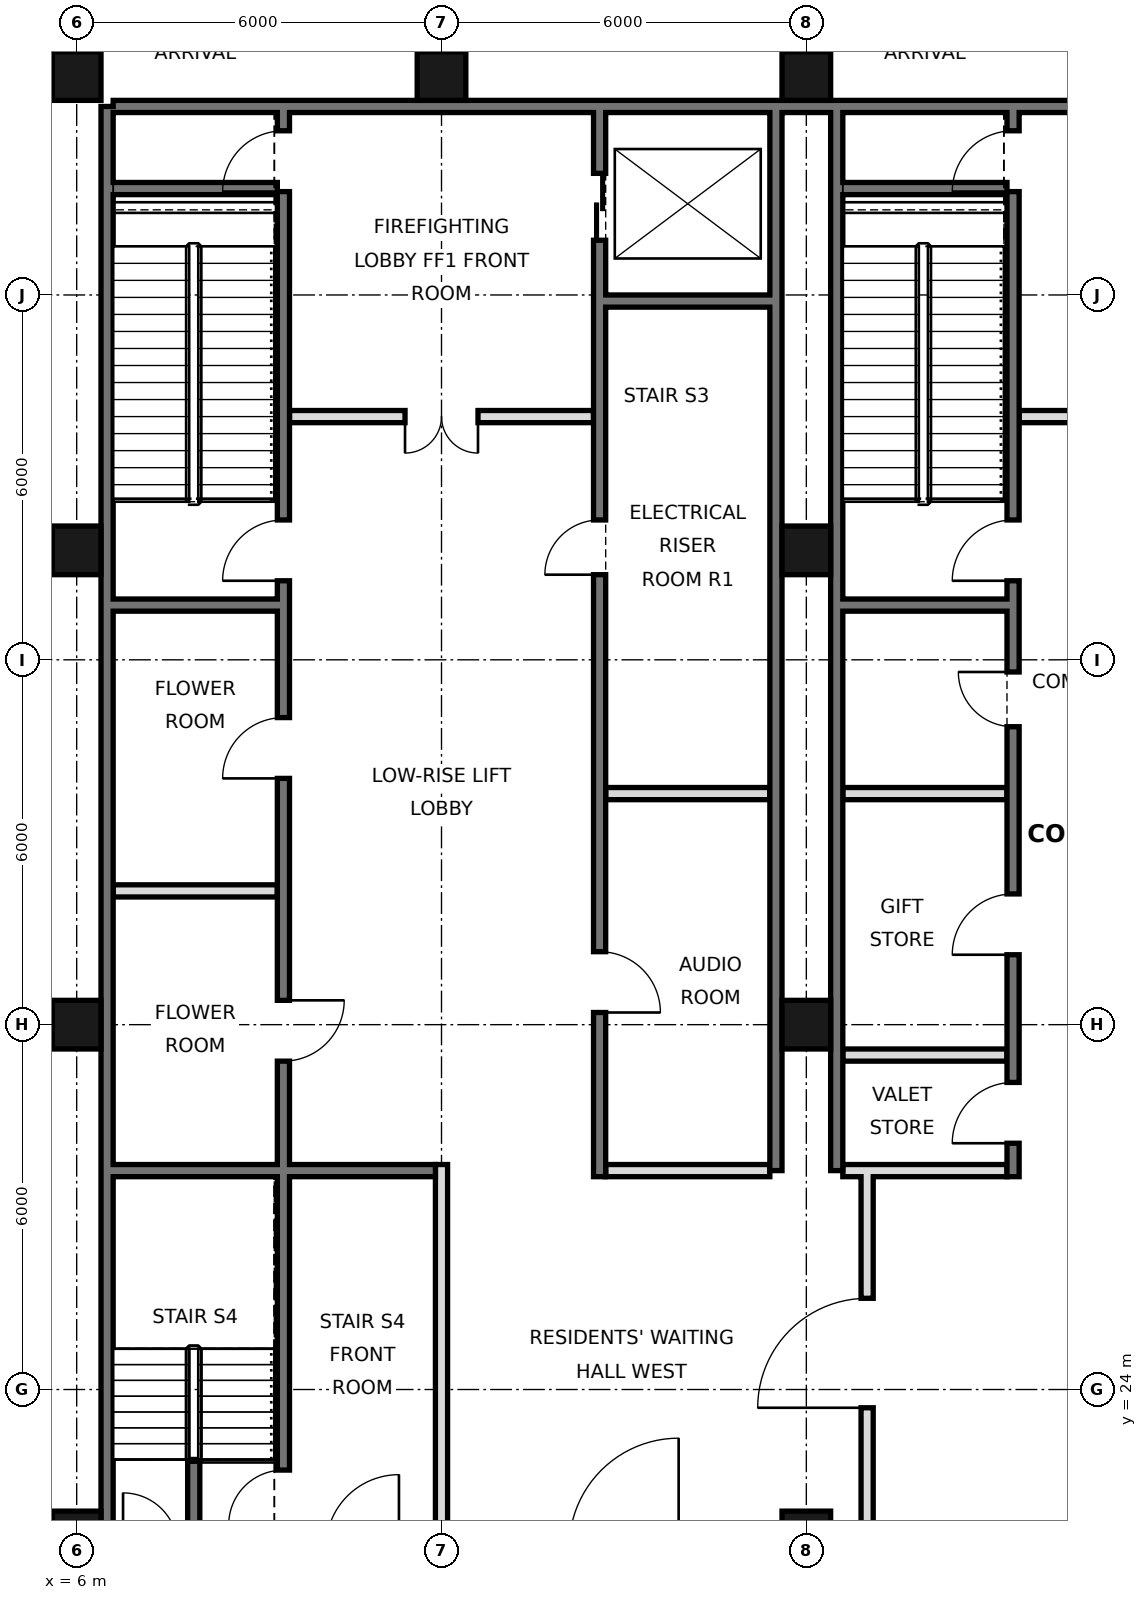
"""IFC4 building model, lengths in metres.
Left out: names, types, materials, properties, quantities, classifications, styles, units other than length and angle.
Written with IfcOpenShell. Run it as: python <this file> out.ifc"""

import sys

from ifc_helpers import new_model, si_unit, direction, frame, frame_2d, origin, origin_2d, place, context, subcontext, project, spatial, rectangle, hollow_rectangle, extrude, element, fill, save


model = new_model("IFC4")
c1 = context("Model", 3, precision=1e-05, world=origin(), true_north=direction((0.0, 1.0)))
c2 = subcontext(c1, "Body", "Model", "MODEL_VIEW")
j1 = project(units=[si_unit("LENGTHUNIT", "METRE"), si_unit("PLANEANGLEUNIT", "RADIAN")], contexts=[c1])
p1 = place(None, origin())
s1 = spatial("IfcSite", under=j1, at=p1, CompositionType="ELEMENT")
p2 = place(p1, origin())
s2 = spatial("IfcBuilding", under=s1, at=p2, CompositionType="ELEMENT")
p3 = place(p2, frame((0.0, 0.0, 234.2)))
s3 = spatial("IfcBuildingStorey", under=s2, at=p3, CompositionType="ELEMENT", Elevation=234.2)
for number, where, z_axis, x_axis in (
    (1, (6.0, 21.6, 0.0), (0.0, 0.0, 1.0), (1.0, 0.0, 0.0)),
    (2, (6.0, 30.0, 0.0), (0.0, 0.0, 1.0), (1.0, 0.0, 0.0)),
    (3, (6.0, 37.8, 0.0), (0.0, 0.0, 1.0), (1.0, 0.0, 0.0)),
    (4, (6.0, 45.6, 0.0), (0.0, 0.0, 1.0), (1.0, 0.0, 0.0)),
    (5, (12.0, 45.6, 0.0), (0.0, 0.0, 1.0), (1.0, 0.0, 0.0)),
    (6, (18.0, 21.6, 0.0), (0.0, 0.0, 1.0), (1.0, 0.0, 0.0)),
    (7, (18.0, 30.0, 0.0), (0.0, 0.0, 1.0), (1.0, 0.0, 0.0)),
    (8, (18.0, 37.8, 0.0), (0.0, 0.0, 1.0), (1.0, 0.0, 0.0)),
    (9, (18.0, 45.6, 0.0), (0.0, 0.0, 1.0), (1.0, 0.0, 0.0)),
):
    element("IfcColumn", number, at=place(p3, frame(where, z_axis=z_axis, x_axis=x_axis)), inside=s3, PredefinedType="COLUMN", context=c2, shape_type="SweptSolid", body=[
        extrude(hollow_rectangle(XDim=0.8, YDim=0.8, WallThickness=0.04, at=origin_2d()), origin(), (0.0, 0.0, 1.0), 5.4),
    ])
p4 = place(p3, frame((6.5, 21.6, 0.0), z_axis=(0.0, 0.0, 1.0), x_axis=(0.0, 1.0, 0.0)))
e10 = element("IfcWall", 10, at=p4, inside=s3, PredefinedType="SOLIDWALL", context=c2, shape_type="SweptSolid", body=[
    extrude(rectangle(XDim=23.5, YDim=0.2, at=frame_2d((11.75, 0.0))), origin(), (0.0, 0.0, 1.0), 5.22),
])
p5 = place(p3, frame((6.6, 45.1, 0.0), z_axis=(0.0, 0.0, 1.0), x_axis=(1.0, 0.0, 0.0)))
e11 = element("IfcWall", 11, at=p5, inside=s3, PredefinedType="SOLIDWALL", context=c2, shape_type="SweptSolid", body=[
    extrude(rectangle(XDim=34.8, YDim=0.2, at=frame_2d((17.4, 0.0))), origin(), (0.0, 0.0, 1.0), 5.22),
])
for number, where, z_axis, x_axis in (
    (12, (17.5, 27.6, 0.0), (0.0, 0.0, 1.0), (0.0, 1.0, 0.0)),
    (13, (18.5, 27.6, 0.0), (0.0, 0.0, 1.0), (0.0, 1.0, 0.0)),
):
    element("IfcWall", number, at=place(p3, frame(where, z_axis=z_axis, x_axis=x_axis)), inside=s3, PredefinedType="SOLIDWALL", context=c2, shape_type="SweptSolid", body=[
        extrude(rectangle(XDim=17.5, YDim=0.2, at=frame_2d((8.75, 0.0))), origin(), (0.0, 0.0, 1.0), 5.22),
    ])
p6 = place(p3, frame((19.0, 21.6, 0.0), z_axis=(0.0, 0.0, 1.0), x_axis=(0.0, 1.0, 0.0)))
e14 = element("IfcWall", 14, at=p6, inside=s3, PredefinedType="PARTITIONING", context=c2, shape_type="SweptSolid", body=[
    extrude(rectangle(XDim=6.0, YDim=0.2, at=frame_2d((3.0, 0.0))), origin(), (0.0, 0.0, 1.0), 5.22),
])
p7 = place(p6, frame((2.1, 0.0, 0.0)))
e15 = element("IfcOpeningElement", 15, at=p7, cuts=e14, PredefinedType="OPENING", context=c2, shape_type="SweptSolid", body=[
    extrude(rectangle(XDim=1.8, YDim=2.1, at=frame_2d((0.9, 1.05))), frame((0.0, 0.11, 0.0), z_axis=(0.0, -1.0, 0.0), x_axis=(1.0, 0.0, 0.0)), (0.0, 0.0, 1.0), 0.22),
])
p8 = place(p3, frame((12.0, 21.6, 0.0), z_axis=(0.0, 0.0, 1.0), x_axis=(0.0, 1.0, 0.0)))
e16 = element("IfcWall", 16, at=p8, inside=s3, PredefinedType="PARTITIONING", context=c2, shape_type="SweptSolid", body=[
    extrude(rectangle(XDim=6.1, YDim=0.2, at=frame_2d((3.05, 0.0))), origin(), (0.0, 0.0, 1.0), 5.22),
])
p9 = place(p3, frame((14.6, 27.5, 0.0), z_axis=(0.0, 0.0, 1.0), x_axis=(0.0, 1.0, 0.0)))
e17 = element("IfcWall", 17, at=p9, inside=s3, PredefinedType="SOLIDWALL", context=c2, shape_type="SweptSolid", body=[
    extrude(rectangle(XDim=17.5, YDim=0.2, at=frame_2d((8.75, 0.0))), origin(), (0.0, 0.0, 1.0), 5.22),
])
p10 = place(p9, frame((15.4, 0.0, 0.0)))
e18 = element("IfcOpeningElement", 18, at=p10, cuts=e17, PredefinedType="OPENING", context=c2, shape_type="SweptSolid", body=[
    extrude(rectangle(XDim=1.1, YDim=2.1, at=frame_2d((0.55, 1.05))), frame((0.0, 0.11, 0.0), z_axis=(0.0, -1.0, 0.0), x_axis=(1.0, 0.0, 0.0)), (0.0, 0.0, 1.0), 0.22),
])
p11 = place(p9, frame((2.7, 0.0, 0.0)))
e19 = element("IfcOpeningElement", 19, at=p11, cuts=e17, PredefinedType="OPENING", context=c2, shape_type="SweptSolid", body=[
    extrude(rectangle(XDim=1.0, YDim=2.1, at=frame_2d((0.5, 1.05))), frame((0.0, 0.11, 0.0), z_axis=(0.0, -1.0, 0.0), x_axis=(1.0, 0.0, 0.0)), (0.0, 0.0, 1.0), 0.22),
])
p12 = place(p9, frame((9.9, 0.0, 0.0)))
e20 = element("IfcOpeningElement", 20, at=p12, cuts=e17, PredefinedType="OPENING", context=c2, shape_type="SweptSolid", body=[
    extrude(rectangle(XDim=0.9, YDim=2.1, at=frame_2d((0.45, 1.05))), frame((0.0, 0.11, 0.0), z_axis=(0.0, -1.0, 0.0), x_axis=(1.0, 0.0, 0.0)), (0.0, 0.0, 1.0), 0.22),
])
p13 = place(p3, frame((21.4, 27.5, 0.0), z_axis=(0.0, 0.0, 1.0), x_axis=(0.0, 1.0, 0.0)))
e21 = element("IfcWall", 21, at=p13, inside=s3, PredefinedType="SOLIDWALL", context=c2, shape_type="SweptSolid", body=[
    extrude(rectangle(XDim=17.5, YDim=0.2, at=frame_2d((8.75, 0.0))), origin(), (0.0, 0.0, 1.0), 5.22),
])
p14 = place(p13, frame((0.55, 0.0, 0.0)))
e22 = element("IfcOpeningElement", 22, at=p14, cuts=e21, PredefinedType="OPENING", context=c2, shape_type="SweptSolid", body=[
    extrude(rectangle(XDim=1.0, YDim=2.1, at=frame_2d((0.5, 1.05))), frame((0.0, 0.11, 0.0), z_axis=(0.0, -1.0, 0.0), x_axis=(1.0, 0.0, 0.0)), (0.0, 0.0, 1.0), 0.22),
])
p15 = place(p13, frame((3.65, 0.0, 0.0)))
e23 = element("IfcOpeningElement", 23, at=p15, cuts=e21, PredefinedType="OPENING", context=c2, shape_type="SweptSolid", body=[
    extrude(rectangle(XDim=1.0, YDim=2.1, at=frame_2d((0.5, 1.05))), frame((0.0, 0.11, 0.0), z_axis=(0.0, -1.0, 0.0), x_axis=(1.0, 0.0, 0.0)), (0.0, 0.0, 1.0), 0.22),
])
p16 = place(p13, frame((16.2, 0.0, 0.0)))
e24 = element("IfcOpeningElement", 24, at=p16, cuts=e21, PredefinedType="OPENING", context=c2, shape_type="SweptSolid", body=[
    extrude(rectangle(XDim=1.0, YDim=2.1, at=frame_2d((0.5, 1.05))), frame((0.0, 0.11, 0.0), z_axis=(0.0, -1.0, 0.0), x_axis=(1.0, 0.0, 0.0)), (0.0, 0.0, 1.0), 0.22),
])
p17 = place(p13, frame((9.8, 0.0, 0.0)))
e25 = element("IfcOpeningElement", 25, at=p17, cuts=e21, PredefinedType="OPENING", context=c2, shape_type="SweptSolid", body=[
    extrude(rectangle(XDim=1.0, YDim=2.1, at=frame_2d((0.5, 1.05))), frame((0.0, 0.11, 0.0), z_axis=(0.0, -1.0, 0.0), x_axis=(1.0, 0.0, 0.0)), (0.0, 0.0, 1.0), 0.22),
])
p18 = place(p13, frame((7.4, 0.0, 0.0)))
e26 = element("IfcOpeningElement", 26, at=p18, cuts=e21, PredefinedType="OPENING", context=c2, shape_type="SweptSolid", body=[
    extrude(rectangle(XDim=0.9, YDim=2.1, at=frame_2d((0.45, 1.05))), frame((0.0, 0.11, 0.0), z_axis=(0.0, -1.0, 0.0), x_axis=(1.0, 0.0, 0.0)), (0.0, 0.0, 1.0), 0.22),
])
p19 = place(p3, frame((7.925, 21.6, 0.0), z_axis=(0.0, 0.0, 1.0), x_axis=(0.0, 1.0, 0.0)))
e27 = element("IfcWall", 27, at=p19, inside=s3, PredefinedType="SOLIDWALL", context=c2, shape_type="SweptSolid", body=[
    extrude(rectangle(XDim=1.25, YDim=0.2, at=frame_2d((0.625, 0.0))), origin(), (0.0, 0.0, 1.0), 5.22),
])
p20 = place(p3, frame((9.4, 21.6, 0.0), z_axis=(0.0, 0.0, 1.0), x_axis=(0.0, 1.0, 0.0)))
e28 = element("IfcWall", 28, at=p20, inside=s3, PredefinedType="SOLIDWALL", context=c2, shape_type="SweptSolid", body=[
    extrude(rectangle(XDim=23.4, YDim=0.2, at=frame_2d((11.7, 0.0))), origin(), (0.0, 0.0, 1.0), 5.22),
])
p21 = place(p20, frame((7.8, 0.0, 0.0)))
e29 = element("IfcOpeningElement", 29, at=p21, cuts=e28, PredefinedType="OPENING", context=c2, shape_type="SweptSolid", body=[
    extrude(rectangle(XDim=1.0, YDim=2.1, at=frame_2d((0.5, 1.05))), frame((0.0, 0.11, 0.0), z_axis=(0.0, -1.0, 0.0), x_axis=(1.0, 0.0, 0.0)), (0.0, 0.0, 1.0), 0.22),
])
p22 = place(p20, frame((12.45, 0.0, 0.0)))
e30 = element("IfcOpeningElement", 30, at=p22, cuts=e28, PredefinedType="OPENING", context=c2, shape_type="SweptSolid", body=[
    extrude(rectangle(XDim=1.0, YDim=2.1, at=frame_2d((0.5, 1.05))), frame((0.0, 0.11, 0.0), z_axis=(0.0, -1.0, 0.0), x_axis=(1.0, 0.0, 0.0)), (0.0, 0.0, 1.0), 0.22),
])
p23 = place(p20, frame((22.1, 0.0, 0.0)))
e31 = element("IfcOpeningElement", 31, at=p23, cuts=e28, PredefinedType="OPENING", context=c2, shape_type="SweptSolid", body=[
    extrude(rectangle(XDim=1.0, YDim=2.1, at=frame_2d((0.5, 1.05))), frame((0.0, 0.11, 0.0), z_axis=(0.0, -1.0, 0.0), x_axis=(1.0, 0.0, 0.0)), (0.0, 0.0, 1.0), 0.22),
])
p24 = place(p20, frame((15.7, 0.0, 0.0)))
e32 = element("IfcOpeningElement", 32, at=p24, cuts=e28, PredefinedType="OPENING", context=c2, shape_type="SweptSolid", body=[
    extrude(rectangle(XDim=1.0, YDim=2.1, at=frame_2d((0.5, 1.05))), frame((0.0, 0.11, 0.0), z_axis=(0.0, -1.0, 0.0), x_axis=(1.0, 0.0, 0.0)), (0.0, 0.0, 1.0), 0.22),
])
p25 = place(p20, frame((0.175, 0.0, 0.0)))
e33 = element("IfcOpeningElement", 33, at=p25, cuts=e28, PredefinedType="OPENING", context=c2, shape_type="SweptSolid", body=[
    extrude(rectangle(XDim=0.9, YDim=2.1, at=frame_2d((0.45, 1.05))), frame((0.0, 0.11, 0.0), z_axis=(0.0, -1.0, 0.0), x_axis=(1.0, 0.0, 0.0)), (0.0, 0.0, 1.0), 0.22),
])
for number, where, z_axis, x_axis in (
    (34, (14.7, 27.6, 0.0), (0.0, 0.0, 1.0), (1.0, 0.0, 0.0)),
    (35, (18.6, 27.6, 0.0), (0.0, 0.0, 1.0), (1.0, 0.0, 0.0)),
):
    element("IfcWall", number, at=place(p3, frame(where, z_axis=z_axis, x_axis=x_axis)), inside=s3, PredefinedType="PARTITIONING", context=c2, shape_type="SweptSolid", body=[
        extrude(rectangle(XDim=2.7, YDim=0.2, at=frame_2d((1.35, 0.0))), origin(), (0.0, 0.0, 1.0), 5.22),
    ])
p26 = place(p3, frame((6.6, 27.6, 0.0), z_axis=(0.0, 0.0, 1.0), x_axis=(1.0, 0.0, 0.0)))
e36 = element("IfcWall", 36, at=p26, inside=s3, PredefinedType="SOLIDWALL", context=c2, shape_type="SweptSolid", body=[
    extrude(rectangle(XDim=5.3, YDim=0.2, at=frame_2d((2.65, 0.0))), origin(), (0.0, 0.0, 1.0), 5.22),
])
for number, where, z_axis, x_axis in (
    (37, (18.6, 29.5, 0.0), (0.0, 0.0, 1.0), (1.0, 0.0, 0.0)),
    (38, (6.6, 32.2, 0.0), (0.0, 0.0, 1.0), (1.0, 0.0, 0.0)),
):
    element("IfcWall", number, at=place(p3, frame(where, z_axis=z_axis, x_axis=x_axis)), inside=s3, PredefinedType="PARTITIONING", context=c2, shape_type="SweptSolid", body=[
        extrude(rectangle(XDim=2.7, YDim=0.2, at=frame_2d((1.35, 0.0))), origin(), (0.0, 0.0, 1.0), 5.22),
    ])
for number, where, z_axis, x_axis in (
    (39, (14.7, 33.8, 0.0), (0.0, 0.0, 1.0), (1.0, 0.0, 0.0)),
    (40, (18.6, 33.8, 0.0), (0.0, 0.0, 1.0), (1.0, 0.0, 0.0)),
    (41, (18.6, 36.9, 0.0), (0.0, 0.0, 1.0), (1.0, 0.0, 0.0)),
    (42, (6.6, 36.9, 0.0), (0.0, 0.0, 1.0), (1.0, 0.0, 0.0)),
):
    element("IfcWall", number, at=place(p3, frame(where, z_axis=z_axis, x_axis=x_axis)), inside=s3, PredefinedType="SOLIDWALL", context=c2, shape_type="SweptSolid", body=[
        extrude(rectangle(XDim=2.7, YDim=0.2, at=frame_2d((1.35, 0.0))), origin(), (0.0, 0.0, 1.0), 5.22),
    ])
p27 = place(p3, frame((21.5, 40.0, 0.0), z_axis=(0.0, 0.0, 1.0), x_axis=(1.0, 0.0, 0.0)))
e43 = element("IfcWall", 43, at=p27, inside=s3, PredefinedType="PARTITIONING", context=c2, shape_type="SweptSolid", body=[
    extrude(rectangle(XDim=5.0, YDim=0.2, at=frame_2d((2.5, 0.0))), origin(), (0.0, 0.0, 1.0), 5.22),
])
p28 = place(p27, frame((1.9, 0.0, 0.0)))
e44 = element("IfcOpeningElement", 44, at=p28, cuts=e43, PredefinedType="OPENING", context=c2, shape_type="SweptSolid", body=[
    extrude(rectangle(XDim=1.2, YDim=2.1, at=frame_2d((0.6, 1.05))), frame((0.0, 0.11, 0.0), z_axis=(0.0, -1.0, 0.0), x_axis=(1.0, 0.0, 0.0)), (0.0, 0.0, 1.0), 0.22),
])
p29 = place(p3, frame((9.5, 40.0, 0.0), z_axis=(0.0, 0.0, 1.0), x_axis=(1.0, 0.0, 0.0)))
e45 = element("IfcWall", 45, at=p29, inside=s3, PredefinedType="PARTITIONING", context=c2, shape_type="SweptSolid", body=[
    extrude(rectangle(XDim=5.0, YDim=0.2, at=frame_2d((2.5, 0.0))), origin(), (0.0, 0.0, 1.0), 5.22),
])
p30 = place(p29, frame((1.9, 0.0, 0.0)))
e46 = element("IfcOpeningElement", 46, at=p30, cuts=e45, PredefinedType="OPENING", context=c2, shape_type="SweptSolid", body=[
    extrude(rectangle(XDim=1.2, YDim=2.1, at=frame_2d((0.6, 1.05))), frame((0.0, 0.11, 0.0), z_axis=(0.0, -1.0, 0.0), x_axis=(1.0, 0.0, 0.0)), (0.0, 0.0, 1.0), 0.22),
])
p31 = place(p3, frame((14.7, 41.9, 0.0), z_axis=(0.0, 0.0, 1.0), x_axis=(1.0, 0.0, 0.0)))
e47 = element("IfcWall", 47, at=p31, inside=s3, PredefinedType="SOLIDWALL", context=c2, shape_type="SweptSolid", body=[
    extrude(rectangle(XDim=2.7, YDim=0.2, at=frame_2d((1.35, 0.0))), origin(), (0.0, 0.0, 1.0), 5.22),
])
for number, where, z_axis, x_axis in (
    (48, (18.6, 43.75, 0.0), (0.0, 0.0, 1.0), (1.0, 0.0, 0.0)),
    (49, (6.6, 43.75, 0.0), (0.0, 0.0, 1.0), (1.0, 0.0, 0.0)),
):
    element("IfcWall", number, at=place(p3, frame(where, z_axis=z_axis, x_axis=x_axis)), inside=s3, PredefinedType="SOLIDWALL", context=c2, shape_type="SweptSolid", body=[
        extrude(rectangle(XDim=2.7, YDim=0.2, at=frame_2d((1.35, 0.0))), origin(), (0.0, 0.0, 1.0), 2.5),
    ])
p32 = place(p7, origin())
e50 = element("IfcDoor", 50, at=p32, inside=s3, OperationType="SINGLE_SWING_LEFT", PredefinedType="DOOR", context=c2, shape_type="SweptSolid", body=[
    extrude(rectangle(XDim=1.8, YDim=2.1, at=frame_2d((0.9, 1.05))), frame((0.0, 0.025, 0.0), z_axis=(0.0, -1.0, 0.0), x_axis=(1.0, 0.0, 0.0)), (0.0, 0.0, 1.0), 0.05),
])
fill(e15, e50)
p33 = place(p30, frame((1.2, 0.0, 0.0), z_axis=(0.0, 0.0, 1.0), x_axis=(-1.0, 0.0, 0.0)))
e51 = element("IfcDoor", 51, at=p33, inside=s3, OperationType="DOUBLE_DOOR_SINGLE_SWING", PredefinedType="DOOR", context=c2, shape_type="SweptSolid", body=[
    extrude(rectangle(XDim=1.2, YDim=2.1, at=frame_2d((0.6, 1.05))), frame((0.0, 0.025, 0.0), z_axis=(0.0, -1.0, 0.0), x_axis=(1.0, 0.0, 0.0)), (0.0, 0.0, 1.0), 0.05),
])
fill(e46, e51)
p34 = place(p10, origin())
e52 = element("IfcDoor", 52, at=p34, inside=s3, OperationType="DOUBLE_DOOR_SLIDING", PredefinedType="DOOR", context=c2, shape_type="SweptSolid", body=[
    extrude(rectangle(XDim=1.1, YDim=2.1, at=frame_2d((0.55, 1.05))), frame((0.0, 0.025, 0.0), z_axis=(0.0, -1.0, 0.0), x_axis=(1.0, 0.0, 0.0)), (0.0, 0.0, 1.0), 0.05),
])
fill(e18, e52)
p35 = place(p14, origin())
e53 = element("IfcDoor", 53, at=p35, inside=s3, OperationType="SINGLE_SWING_LEFT", PredefinedType="DOOR", context=c2, shape_type="SweptSolid", body=[
    extrude(rectangle(XDim=1.0, YDim=2.1, at=frame_2d((0.5, 1.05))), frame((0.0, 0.025, 0.0), z_axis=(0.0, -1.0, 0.0), x_axis=(1.0, 0.0, 0.0)), (0.0, 0.0, 1.0), 0.05),
])
fill(e22, e53)
p36 = place(p15, origin())
e54 = element("IfcDoor", 54, at=p36, inside=s3, OperationType="SINGLE_SWING_LEFT", PredefinedType="DOOR", context=c2, shape_type="SweptSolid", body=[
    extrude(rectangle(XDim=1.0, YDim=2.1, at=frame_2d((0.5, 1.05))), frame((0.0, 0.025, 0.0), z_axis=(0.0, -1.0, 0.0), x_axis=(1.0, 0.0, 0.0)), (0.0, 0.0, 1.0), 0.05),
])
fill(e23, e54)
p37 = place(p11, frame((1.0, 0.0, 0.0), z_axis=(0.0, 0.0, 1.0), x_axis=(-1.0, 0.0, 0.0)))
e55 = element("IfcDoor", 55, at=p37, inside=s3, OperationType="SINGLE_SWING_RIGHT", PredefinedType="DOOR", context=c2, shape_type="SweptSolid", body=[
    extrude(rectangle(XDim=1.0, YDim=2.1, at=frame_2d((0.5, 1.05))), frame((0.0, 0.025, 0.0), z_axis=(0.0, -1.0, 0.0), x_axis=(1.0, 0.0, 0.0)), (0.0, 0.0, 1.0), 0.05),
])
fill(e19, e55)
p38 = place(p21, origin())
e56 = element("IfcDoor", 56, at=p38, inside=s3, OperationType="SINGLE_SWING_RIGHT", PredefinedType="DOOR", context=c2, shape_type="SweptSolid", body=[
    extrude(rectangle(XDim=1.0, YDim=2.1, at=frame_2d((0.5, 1.05))), frame((0.0, 0.025, 0.0), z_axis=(0.0, -1.0, 0.0), x_axis=(1.0, 0.0, 0.0)), (0.0, 0.0, 1.0), 0.05),
])
fill(e29, e56)
p39 = place(p22, origin())
e57 = element("IfcDoor", 57, at=p39, inside=s3, OperationType="SINGLE_SWING_LEFT", PredefinedType="DOOR", context=c2, shape_type="SweptSolid", body=[
    extrude(rectangle(XDim=1.0, YDim=2.1, at=frame_2d((0.5, 1.05))), frame((0.0, 0.025, 0.0), z_axis=(0.0, -1.0, 0.0), x_axis=(1.0, 0.0, 0.0)), (0.0, 0.0, 1.0), 0.05),
])
fill(e30, e57)
p40 = place(p23, origin())
e58 = element("IfcDoor", 58, at=p40, inside=s3, OperationType="SINGLE_SWING_LEFT", PredefinedType="DOOR", context=c2, shape_type="SweptSolid", body=[
    extrude(rectangle(XDim=1.0, YDim=2.1, at=frame_2d((0.5, 1.05))), frame((0.0, 0.025, 0.0), z_axis=(0.0, -1.0, 0.0), x_axis=(1.0, 0.0, 0.0)), (0.0, 0.0, 1.0), 0.05),
])
fill(e31, e58)
p41 = place(p24, origin())
e59 = element("IfcDoor", 59, at=p41, inside=s3, OperationType="SINGLE_SWING_LEFT", PredefinedType="DOOR", context=c2, shape_type="SweptSolid", body=[
    extrude(rectangle(XDim=1.0, YDim=2.1, at=frame_2d((0.5, 1.05))), frame((0.0, 0.025, 0.0), z_axis=(0.0, -1.0, 0.0), x_axis=(1.0, 0.0, 0.0)), (0.0, 0.0, 1.0), 0.05),
])
fill(e32, e59)
p42 = place(p16, origin())
e60 = element("IfcDoor", 60, at=p42, inside=s3, OperationType="SINGLE_SWING_LEFT", PredefinedType="DOOR", context=c2, shape_type="SweptSolid", body=[
    extrude(rectangle(XDim=1.0, YDim=2.1, at=frame_2d((0.5, 1.05))), frame((0.0, 0.025, 0.0), z_axis=(0.0, -1.0, 0.0), x_axis=(1.0, 0.0, 0.0)), (0.0, 0.0, 1.0), 0.05),
])
fill(e24, e60)
p43 = place(p17, origin())
e61 = element("IfcDoor", 61, at=p43, inside=s3, OperationType="SINGLE_SWING_LEFT", PredefinedType="DOOR", context=c2, shape_type="SweptSolid", body=[
    extrude(rectangle(XDim=1.0, YDim=2.1, at=frame_2d((0.5, 1.05))), frame((0.0, 0.025, 0.0), z_axis=(0.0, -1.0, 0.0), x_axis=(1.0, 0.0, 0.0)), (0.0, 0.0, 1.0), 0.05),
])
fill(e25, e61)
p44 = place(p25, origin())
e62 = element("IfcDoor", 62, at=p44, inside=s3, OperationType="SINGLE_SWING_LEFT", PredefinedType="DOOR", context=c2, shape_type="SweptSolid", body=[
    extrude(rectangle(XDim=0.9, YDim=2.1, at=frame_2d((0.45, 1.05))), frame((0.0, 0.025, 0.0), z_axis=(0.0, -1.0, 0.0), x_axis=(1.0, 0.0, 0.0)), (0.0, 0.0, 1.0), 0.05),
])
fill(e33, e62)
p45 = place(p12, origin())
e63 = element("IfcDoor", 63, at=p45, inside=s3, OperationType="SINGLE_SWING_LEFT", PredefinedType="DOOR", context=c2, shape_type="SweptSolid", body=[
    extrude(rectangle(XDim=0.9, YDim=2.1, at=frame_2d((0.45, 1.05))), frame((0.0, 0.025, 0.0), z_axis=(0.0, -1.0, 0.0), x_axis=(1.0, 0.0, 0.0)), (0.0, 0.0, 1.0), 0.05),
])
fill(e20, e63)
p46 = place(p18, frame((0.9, 0.0, 0.0), z_axis=(0.0, 0.0, 1.0), x_axis=(-1.0, 0.0, 0.0)))
e64 = element("IfcDoor", 64, at=p46, inside=s3, OperationType="SINGLE_SWING_LEFT", PredefinedType="DOOR", context=c2, shape_type="SweptSolid", body=[
    extrude(rectangle(XDim=0.9, YDim=2.1, at=frame_2d((0.45, 1.05))), frame((0.0, 0.025, 0.0), z_axis=(0.0, -1.0, 0.0), x_axis=(1.0, 0.0, 0.0)), (0.0, 0.0, 1.0), 0.05),
])
fill(e26, e64)
save(model, sys.argv[1])
